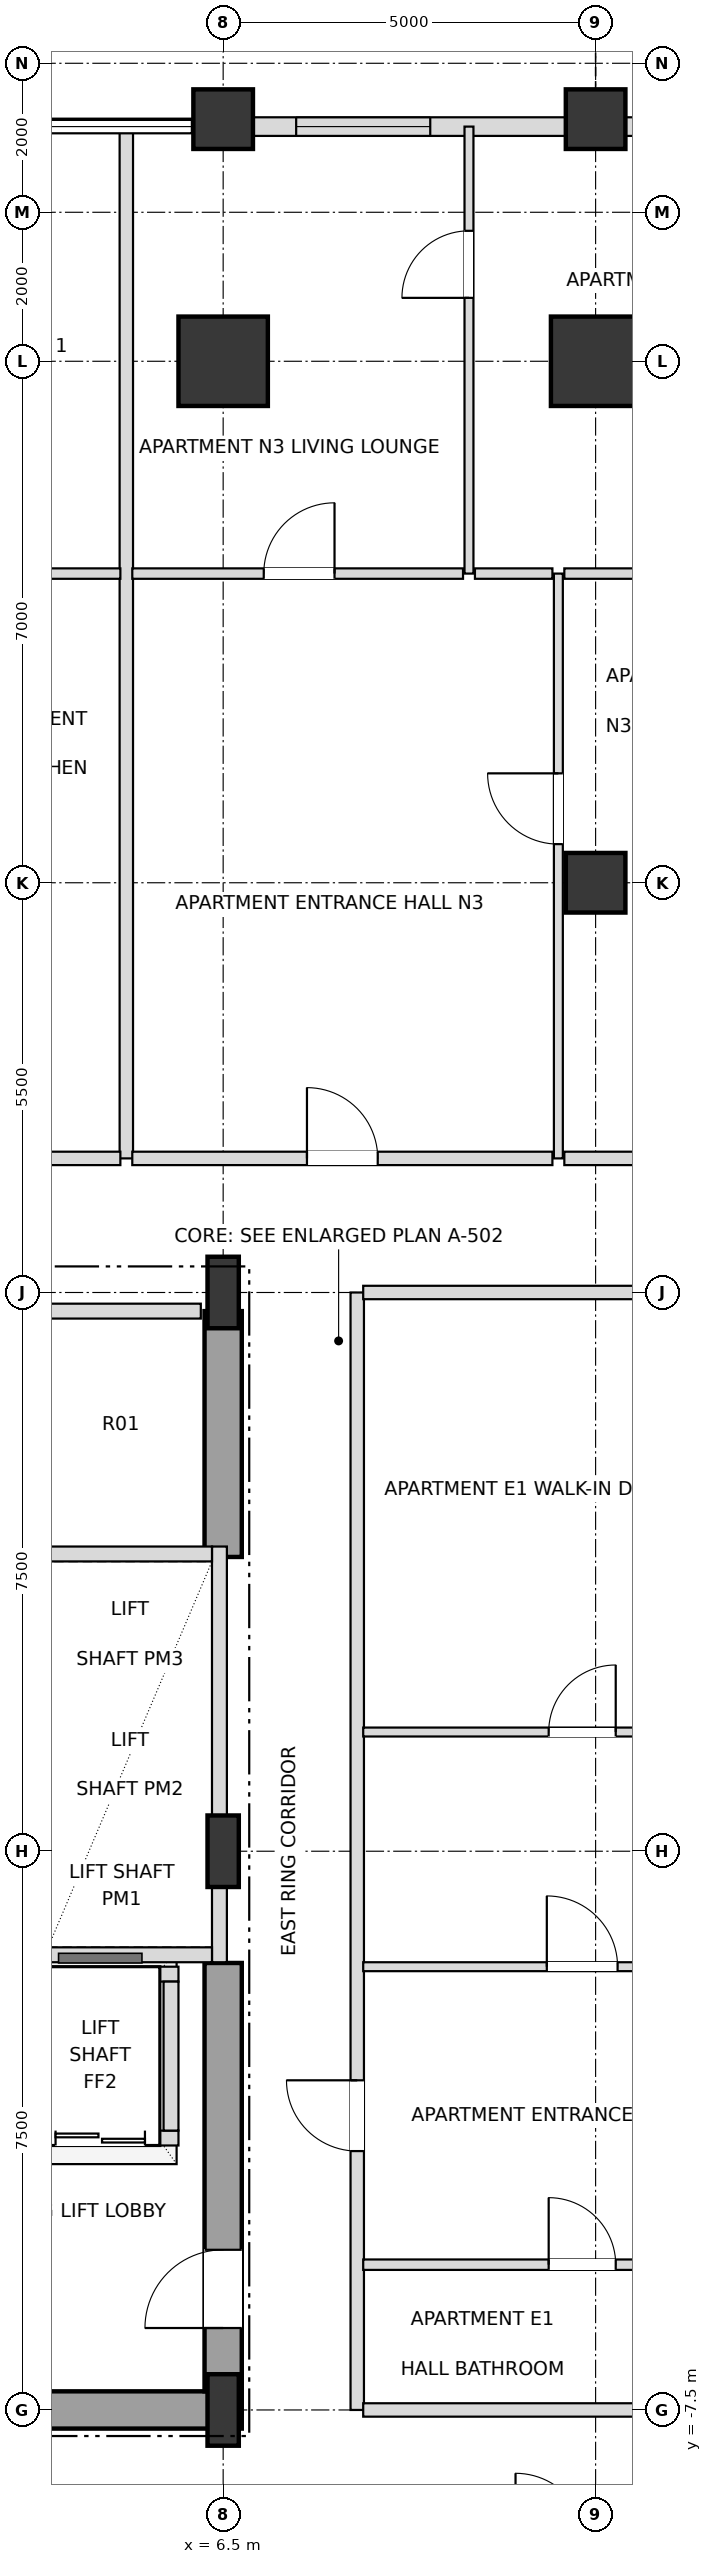
"""IFC4 building model, lengths in metres.
Left out: names, types, materials, properties, quantities, classifications, styles, units other than length and angle.
Written with IfcOpenShell. Run it as: python <this file> out.ifc"""

import sys

from ifc_helpers import new_model, si_unit, direction, frame, frame_2d, origin, origin_2d, place, context, subcontext, project, spatial, rectangle, i_section, extrude, element, fill, save


model = new_model("IFC4")
c1 = context("Model", 3, precision=1e-05, world=origin(), true_north=direction((0.0, 1.0)))
c2 = subcontext(c1, "Body", "Model", "MODEL_VIEW")
j1 = project(units=[si_unit("LENGTHUNIT", "METRE"), si_unit("PLANEANGLEUNIT", "RADIAN")], contexts=[c1])
p1 = place(None, origin())
s1 = spatial("IfcSite", under=j1, at=p1, CompositionType="ELEMENT")
p2 = place(p1, origin())
s2 = spatial("IfcBuilding", under=s1, at=p2, CompositionType="ELEMENT")
p3 = place(p2, frame((0.0, 0.0, 109.8)))
s3 = spatial("IfcBuildingStorey", under=s2, at=p3, CompositionType="ELEMENT", Elevation=109.8)
for number, where, z_axis, x_axis in (
    (1, (6.5, -7.5, 0.0), (0.0, 0.0, 1.0), (1.0, 0.0, 0.0)),
    (2, (6.5, 0.0, 0.0), (0.0, 0.0, 1.0), (1.0, 0.0, 0.0)),
    (3, (6.5, 7.5, 0.0), (0.0, 0.0, 1.0), (1.0, 0.0, 0.0)),
):
    element("IfcColumn", number, at=place(p3, frame(where, z_axis=z_axis, x_axis=x_axis)), inside=s3, PredefinedType="COLUMN", context=c2, shape_type="SweptSolid", body=[
        extrude(i_section(OverallWidth=0.42, OverallDepth=0.96, WebThickness=0.022, FlangeThickness=0.034, at=origin_2d()), origin(), (0.0, 0.0, 1.0), 3.6),
    ])
for number, where, z_axis, x_axis in (
    (4, (11.5, 20.0, 0.0), (0.0, 0.0, 1.0), (1.0, 0.0, 0.0)),
    (5, (6.5, 20.0, 0.0), (0.0, 0.0, 1.0), (1.0, 0.0, 0.0)),
):
    element("IfcColumn", number, at=place(p3, frame(where, z_axis=z_axis, x_axis=x_axis)), inside=s3, PredefinedType="USERDEFINED", context=c2, shape_type="SweptSolid", body=[
        extrude(rectangle(XDim=1.2, YDim=1.2, at=origin_2d()), origin(), (0.0, 0.0, 1.0), 3.6),
    ])
for number, where, z_axis, x_axis in (
    (6, (11.5, 13.0, 0.0), (0.0, 0.0, 1.0), (1.0, 0.0, 0.0)),
    (7, (6.5, 23.25, 0.0), (0.0, 0.0, 1.0), (1.0, 0.0, 0.0)),
    (8, (11.5, 23.25, 0.0), (0.0, 0.0, 1.0), (1.0, 0.0, 0.0)),
):
    element("IfcColumn", number, at=place(p3, frame(where, z_axis=z_axis, x_axis=x_axis)), inside=s3, PredefinedType="COLUMN", context=c2, shape_type="SweptSolid", body=[
        extrude(rectangle(XDim=0.8, YDim=0.8, at=origin_2d()), origin(), (0.0, 0.0, 1.0), 3.6),
    ])
p4 = place(p3, frame((15.675, 23.15, 0.0), z_axis=(0.0, 0.0, 1.0), x_axis=(-1.0, 0.0, 0.0)))
e9 = element("IfcWall", 9, at=p4, inside=s3, PredefinedType="SOLIDWALL", context=c2, shape_type="SweptSolid", body=[
    extrude(rectangle(XDim=3.78, YDim=0.25, at=frame_2d((1.89, 0.0))), origin(), (0.0, 0.0, 1.0), 2.736),
])
p5 = place(p4, frame((0.968, 0.0, 0.72)))
e10 = element("IfcOpeningElement", 10, at=p5, cuts=e9, PredefinedType="OPENING", context=c2, shape_type="SweptSolid", body=[
    extrude(rectangle(XDim=1.8, YDim=1.68, at=frame_2d((0.9, 0.84))), frame((0.0, 0.135, 0.0), z_axis=(0.0, -1.0, 0.0), x_axis=(1.0, 0.0, 0.0)), (0.0, 0.0, 1.0), 0.27),
])
p6 = place(p3, frame((11.105, 23.15, 0.0), z_axis=(0.0, 0.0, 1.0), x_axis=(-1.0, 0.0, 0.0)))
e11 = element("IfcWall", 11, at=p6, inside=s3, PredefinedType="SOLIDWALL", context=c2, shape_type="SweptSolid", body=[
    extrude(rectangle(XDim=4.21, YDim=0.25, at=frame_2d((2.105, 0.0))), origin(), (0.0, 0.0, 1.0), 2.736),
])
p7 = place(p6, frame((1.825, 0.0, 0.72)))
e12 = element("IfcOpeningElement", 12, at=p7, cuts=e11, PredefinedType="OPENING", context=c2, shape_type="SweptSolid", body=[
    extrude(rectangle(XDim=1.8, YDim=1.68, at=frame_2d((0.9, 0.84))), frame((0.0, 0.135, 0.0), z_axis=(0.0, -1.0, 0.0), x_axis=(1.0, 0.0, 0.0)), (0.0, 0.0, 1.0), 0.27),
])
p8 = place(p3, frame((0.0, -7.5, 0.0), z_axis=(0.0, 0.0, 1.0), x_axis=(1.0, 0.0, 0.0)))
e13 = element("IfcWall", 13, at=p8, inside=s3, PredefinedType="SHEAR", context=c2, shape_type="SweptSolid", body=[
    extrude(rectangle(XDim=6.75, YDim=0.5, at=frame_2d((3.375, 0.0))), origin(), (0.0, 0.0, 1.0), 3.38),
])
p9 = place(p3, frame((6.5, -7.25, 0.0), z_axis=(0.0, 0.0, 1.0), x_axis=(0.0, 1.0, 0.0)))
e14 = element("IfcWall", 14, at=p9, inside=s3, PredefinedType="SHEAR", context=c2, shape_type="SweptSolid", body=[
    extrude(rectangle(XDim=5.75, YDim=0.5, at=frame_2d((2.875, 0.0))), origin(), (0.0, 0.0, 1.0), 3.38),
])
p10 = place(p9, frame((0.85, 0.0, 0.0)))
e15 = element("IfcOpeningElement", 15, at=p10, cuts=e14, PredefinedType="OPENING", context=c2, shape_type="SweptSolid", body=[
    extrude(rectangle(XDim=1.05, YDim=2.15, at=frame_2d((0.525, 1.075))), frame((0.0, 0.26, 0.0), z_axis=(0.0, -1.0, 0.0), x_axis=(1.0, 0.0, 0.0)), (0.0, 0.0, 1.0), 0.52),
])
p11 = place(p3, frame((6.5, 3.95, 0.0), z_axis=(0.0, 0.0, 1.0), x_axis=(0.0, 1.0, 0.0)))
e16 = element("IfcWall", 16, at=p11, inside=s3, PredefinedType="SHEAR", context=c2, shape_type="SweptSolid", body=[
    extrude(rectangle(XDim=3.3, YDim=0.5, at=frame_2d((1.65, 0.0))), origin(), (0.0, 0.0, 1.0), 3.38),
])
p12 = place(p3, frame((6.45, -1.49, 0.0), z_axis=(0.0, 0.0, 1.0), x_axis=(0.0, 1.0, 0.0)))
e17 = element("IfcWall", 17, at=p12, inside=s3, PredefinedType="SOLIDWALL", context=c2, shape_type="SweptSolid", body=[
    extrude(rectangle(XDim=5.58, YDim=0.2, at=frame_2d((2.79, 0.0))), origin(), (0.0, 0.0, 1.0), 2.816),
])
for number, where, z_axis, x_axis in (
    (18, (4.15, -1.39, 0.0), (0.0, 0.0, 1.0), (1.0, 0.0, 0.0)),
    (19, (4.15, 3.99, 0.0), (0.0, 0.0, 1.0), (1.0, 0.0, 0.0)),
):
    element("IfcWall", number, at=place(p3, frame(where, z_axis=z_axis, x_axis=x_axis)), inside=s3, PredefinedType="SOLIDWALL", context=c2, shape_type="SweptSolid", body=[
        extrude(rectangle(XDim=2.2, YDim=0.2, at=frame_2d((1.1, 0.0))), origin(), (0.0, 0.0, 1.0), 3.38),
    ])
p13 = place(p3, frame((1.8, -3.85, 0.0), z_axis=(0.0, 0.0, 1.0), x_axis=(1.0, 0.0, 0.0)))
e20 = element("IfcWall", 20, at=p13, inside=s3, PredefinedType="SOLIDWALL", context=c2, shape_type="SweptSolid", body=[
    extrude(rectangle(XDim=4.1, YDim=0.2, at=frame_2d((2.05, 0.0))), origin(), (0.0, 0.0, 1.0), 3.38),
])
p14 = place(p13, frame((0.45, 0.0, 0.0)))
e21 = element("IfcOpeningElement", 21, at=p14, cuts=e20, PredefinedType="OPENING", context=c2, shape_type="SweptSolid", body=[
    extrude(rectangle(XDim=1.2, YDim=2.2, at=frame_2d((0.6, 1.1))), frame((0.0, 0.11, 0.0), z_axis=(0.0, -1.0, 0.0), x_axis=(1.0, 0.0, 0.0)), (0.0, 0.0, 1.0), 0.22),
])
p15 = place(p13, frame((2.45, 0.0, 0.0)))
e22 = element("IfcOpeningElement", 22, at=p15, cuts=e20, PredefinedType="OPENING", context=c2, shape_type="SweptSolid", body=[
    extrude(rectangle(XDim=1.2, YDim=2.2, at=frame_2d((0.6, 1.1))), frame((0.0, 0.11, 0.0), z_axis=(0.0, -1.0, 0.0), x_axis=(1.0, 0.0, 0.0)), (0.0, 0.0, 1.0), 0.22),
])
p16 = place(p3, frame((1.8, -1.65, 0.0), z_axis=(0.0, 0.0, 1.0), x_axis=(1.0, 0.0, 0.0)))
e23 = element("IfcWall", 23, at=p16, inside=s3, PredefinedType="SOLIDWALL", context=c2, shape_type="SweptSolid", body=[
    extrude(rectangle(XDim=4.1, YDim=0.2, at=frame_2d((2.05, 0.0))), origin(), (0.0, 0.0, 1.0), 3.38),
])
p17 = place(p3, frame((5.8, -3.75, 0.0), z_axis=(0.0, 0.0, 1.0), x_axis=(0.0, 1.0, 0.0)))
e24 = element("IfcWall", 24, at=p17, inside=s3, PredefinedType="SOLIDWALL", context=c2, shape_type="SweptSolid", body=[
    extrude(rectangle(XDim=2.0, YDim=0.2, at=frame_2d((1.0, 0.0))), origin(), (0.0, 0.0, 1.0), 3.38),
])
p18 = place(p3, frame((5.2, 9.3, 0.0), z_axis=(0.0, 0.0, 1.0), x_axis=(0.0, 1.0, 0.0)))
e25 = element("IfcWall", 25, at=p18, inside=s3, PredefinedType="PARTITIONING", context=c2, shape_type="SweptSolid", body=[
    extrude(rectangle(XDim=13.85, YDim=0.18, at=frame_2d((6.925, 0.0))), origin(), (0.0, 0.0, 1.0), 2.816),
])
p19 = place(p3, frame((8.3, -7.5, 0.0), z_axis=(0.0, 0.0, 1.0), x_axis=(0.0, 1.0, 0.0)))
e26 = element("IfcWall", 26, at=p19, inside=s3, PredefinedType="PARTITIONING", context=c2, shape_type="SweptSolid", body=[
    extrude(rectangle(XDim=15.0, YDim=0.18, at=frame_2d((7.5, 0.0))), origin(), (0.0, 0.0, 1.0), 3.38),
])
p20 = place(p19, frame((3.475, 0.0, 0.0)))
e27 = element("IfcOpeningElement", 27, at=p20, cuts=e26, PredefinedType="OPENING", context=c2, shape_type="SweptSolid", body=[
    extrude(rectangle(XDim=0.95, YDim=2.15, at=frame_2d((0.475, 1.075))), frame((0.0, 0.1, 0.0), z_axis=(0.0, -1.0, 0.0), x_axis=(1.0, 0.0, 0.0)), (0.0, 0.0, 1.0), 0.2),
])
p21 = place(p3, frame((9.8, 17.15, 0.0), z_axis=(0.0, 0.0, 1.0), x_axis=(0.0, 1.0, 0.0)))
e28 = element("IfcWall", 28, at=p21, inside=s3, PredefinedType="PARTITIONING", context=c2, shape_type="SweptSolid", body=[
    extrude(rectangle(XDim=6.0, YDim=0.12, at=frame_2d((3.0, 0.0))), origin(), (0.0, 0.0, 1.0), 2.816),
])
p22 = place(p21, frame((3.701, 0.0, 0.0)))
e29 = element("IfcOpeningElement", 29, at=p22, cuts=e28, PredefinedType="OPENING", context=c2, shape_type="SweptSolid", body=[
    extrude(rectangle(XDim=0.9, YDim=2.1, at=frame_2d((0.45, 1.05))), frame((0.0, 0.07, 0.0), z_axis=(0.0, -1.0, 0.0), x_axis=(1.0, 0.0, 0.0)), (0.0, 0.0, 1.0), 0.14),
])
p23 = place(p3, frame((11.0, 9.3, 0.0), z_axis=(0.0, 0.0, 1.0), x_axis=(0.0, 1.0, 0.0)))
e30 = element("IfcWall", 30, at=p23, inside=s3, PredefinedType="PARTITIONING", context=c2, shape_type="SweptSolid", body=[
    extrude(rectangle(XDim=7.85, YDim=0.12, at=frame_2d((3.925, 0.0))), origin(), (0.0, 0.0, 1.0), 2.816),
])
p24 = place(p23, frame((4.219, 0.0, 0.0)))
e31 = element("IfcOpeningElement", 31, at=p24, cuts=e30, PredefinedType="OPENING", context=c2, shape_type="SweptSolid", body=[
    extrude(rectangle(XDim=0.95, YDim=2.1, at=frame_2d((0.475, 1.05))), frame((0.0, 0.07, 0.0), z_axis=(0.0, -1.0, 0.0), x_axis=(1.0, 0.0, 0.0)), (0.0, 0.0, 1.0), 0.14),
])
p25 = place(p3, frame((8.38, -7.5, 0.0), z_axis=(0.0, 0.0, 1.0), x_axis=(1.0, 0.0, 0.0)))
e32 = element("IfcWall", 32, at=p25, inside=s3, PredefinedType="PARTITIONING", context=c2, shape_type="SweptSolid", body=[
    extrude(rectangle(XDim=5.89, YDim=0.18, at=frame_2d((2.945, 0.0))), origin(), (0.0, 0.0, 1.0), 2.816),
])
p26 = place(p3, frame((8.38, -5.55, 0.0), z_axis=(0.0, 0.0, 1.0), x_axis=(1.0, 0.0, 0.0)))
e33 = element("IfcWall", 33, at=p26, inside=s3, PredefinedType="PARTITIONING", context=c2, shape_type="SweptSolid", body=[
    extrude(rectangle(XDim=5.89, YDim=0.14, at=frame_2d((2.945, 0.0))), origin(), (0.0, 0.0, 1.0), 3.38),
])
p27 = place(p26, frame((2.49, 0.0, 0.0)))
e34 = element("IfcOpeningElement", 34, at=p27, cuts=e33, PredefinedType="OPENING", context=c2, shape_type="SweptSolid", body=[
    extrude(rectangle(XDim=0.9, YDim=2.1, at=frame_2d((0.45, 1.05))), frame((0.0, 0.08, 0.0), z_axis=(0.0, -1.0, 0.0), x_axis=(1.0, 0.0, 0.0)), (0.0, 0.0, 1.0), 0.16),
])
p28 = place(p3, frame((8.38, -1.55, 0.0), z_axis=(0.0, 0.0, 1.0), x_axis=(1.0, 0.0, 0.0)))
e35 = element("IfcWall", 35, at=p28, inside=s3, PredefinedType="PARTITIONING", context=c2, shape_type="SweptSolid", body=[
    extrude(rectangle(XDim=5.89, YDim=0.12, at=frame_2d((2.945, 0.0))), origin(), (0.0, 0.0, 1.0), 3.38),
])
p29 = place(p28, frame((2.465, 0.0, 0.0)))
e36 = element("IfcOpeningElement", 36, at=p29, cuts=e35, PredefinedType="OPENING", context=c2, shape_type="SweptSolid", body=[
    extrude(rectangle(XDim=0.95, YDim=2.1, at=frame_2d((0.475, 1.05))), frame((0.0, 0.07, 0.0), z_axis=(0.0, -1.0, 0.0), x_axis=(1.0, 0.0, 0.0)), (0.0, 0.0, 1.0), 0.14),
])
p30 = place(p3, frame((8.38, 1.6, 0.0), z_axis=(0.0, 0.0, 1.0), x_axis=(1.0, 0.0, 0.0)))
e37 = element("IfcWall", 37, at=p30, inside=s3, PredefinedType="PARTITIONING", context=c2, shape_type="SweptSolid", body=[
    extrude(rectangle(XDim=5.89, YDim=0.12, at=frame_2d((2.945, 0.0))), origin(), (0.0, 0.0, 1.0), 3.38),
])
p31 = place(p30, frame((2.49, 0.0, 0.0)))
e38 = element("IfcOpeningElement", 38, at=p31, cuts=e37, PredefinedType="OPENING", context=c2, shape_type="SweptSolid", body=[
    extrude(rectangle(XDim=0.9, YDim=2.1, at=frame_2d((0.45, 1.05))), frame((0.0, 0.07, 0.0), z_axis=(0.0, -1.0, 0.0), x_axis=(1.0, 0.0, 0.0)), (0.0, 0.0, 1.0), 0.14),
])
p32 = place(p3, frame((4.13, 7.25, 0.0), z_axis=(0.0, 0.0, 1.0), x_axis=(1.0, 0.0, 0.0)))
e39 = element("IfcWall", 39, at=p32, inside=s3, PredefinedType="SOLIDWALL", context=c2, shape_type="SweptSolid", body=[
    extrude(rectangle(XDim=2.07, YDim=0.2, at=frame_2d((1.035, 0.0))), origin(), (0.0, 0.0, 1.0), 3.38),
])
p33 = place(p3, frame((8.38, 7.5, 0.0), z_axis=(0.0, 0.0, 1.0), x_axis=(1.0, 0.0, 0.0)))
e40 = element("IfcWall", 40, at=p33, inside=s3, PredefinedType="PARTITIONING", context=c2, shape_type="SweptSolid", body=[
    extrude(rectangle(XDim=5.89, YDim=0.18, at=frame_2d((2.945, 0.0))), origin(), (0.0, 0.0, 1.0), 2.816),
])
p34 = place(p3, frame((2.58, 9.3, 0.0), z_axis=(0.0, 0.0, 1.0), x_axis=(1.0, 0.0, 0.0)))
e41 = element("IfcWall", 41, at=p34, inside=s3, PredefinedType="PARTITIONING", context=c2, shape_type="SweptSolid", body=[
    extrude(rectangle(XDim=2.54, YDim=0.18, at=frame_2d((1.27, 0.0))), origin(), (0.0, 0.0, 1.0), 3.38),
])
p35 = place(p3, frame((5.28, 9.3, 0.0), z_axis=(0.0, 0.0, 1.0), x_axis=(1.0, 0.0, 0.0)))
e42 = element("IfcWall", 42, at=p35, inside=s3, PredefinedType="PARTITIONING", context=c2, shape_type="SweptSolid", body=[
    extrude(rectangle(XDim=5.64, YDim=0.18, at=frame_2d((2.82, 0.0))), origin(), (0.0, 0.0, 1.0), 2.816),
])
p36 = place(p35, frame((2.345, 0.0, 0.0)))
e43 = element("IfcOpeningElement", 43, at=p36, cuts=e42, PredefinedType="OPENING", context=c2, shape_type="SweptSolid", body=[
    extrude(rectangle(XDim=0.95, YDim=2.15, at=frame_2d((0.475, 1.075))), frame((0.0, 0.1, 0.0), z_axis=(0.0, -1.0, 0.0), x_axis=(1.0, 0.0, 0.0)), (0.0, 0.0, 1.0), 0.2),
])
p37 = place(p3, frame((11.08, 9.3, 0.0), z_axis=(0.0, 0.0, 1.0), x_axis=(1.0, 0.0, 0.0)))
e44 = element("IfcWall", 44, at=p37, inside=s3, PredefinedType="PARTITIONING", context=c2, shape_type="SweptSolid", body=[
    extrude(rectangle(XDim=2.54, YDim=0.18, at=frame_2d((1.27, 0.0))), origin(), (0.0, 0.0, 1.0), 3.38),
])
p38 = place(p3, frame((2.58, 17.15, 0.0), z_axis=(0.0, 0.0, 1.0), x_axis=(1.0, 0.0, 0.0)))
e45 = element("IfcWall", 45, at=p38, inside=s3, PredefinedType="PARTITIONING", context=c2, shape_type="SweptSolid", body=[
    extrude(rectangle(XDim=2.54, YDim=0.14, at=frame_2d((1.27, 0.0))), origin(), (0.0, 0.0, 1.0), 3.38),
])
p39 = place(p3, frame((5.28, 17.15, 0.0), z_axis=(0.0, 0.0, 1.0), x_axis=(1.0, 0.0, 0.0)))
e46 = element("IfcWall", 46, at=p39, inside=s3, PredefinedType="PARTITIONING", context=c2, shape_type="SweptSolid", body=[
    extrude(rectangle(XDim=4.44, YDim=0.14, at=frame_2d((2.22, 0.0))), origin(), (0.0, 0.0, 1.0), 2.816),
])
p40 = place(p39, frame((1.765, 0.0, 0.0)))
e47 = element("IfcOpeningElement", 47, at=p40, cuts=e46, PredefinedType="OPENING", context=c2, shape_type="SweptSolid", body=[
    extrude(rectangle(XDim=0.95, YDim=2.1, at=frame_2d((0.475, 1.05))), frame((0.0, 0.08, 0.0), z_axis=(0.0, -1.0, 0.0), x_axis=(1.0, 0.0, 0.0)), (0.0, 0.0, 1.0), 0.16),
])
p41 = place(p3, frame((9.88, 17.15, 0.0), z_axis=(0.0, 0.0, 1.0), x_axis=(1.0, 0.0, 0.0)))
e48 = element("IfcWall", 48, at=p41, inside=s3, PredefinedType="PARTITIONING", context=c2, shape_type="SweptSolid", body=[
    extrude(rectangle(XDim=1.04, YDim=0.14, at=frame_2d((0.52, 0.0))), origin(), (0.0, 0.0, 1.0), 3.38),
])
p42 = place(p3, frame((11.08, 17.15, 0.0), z_axis=(0.0, 0.0, 1.0), x_axis=(1.0, 0.0, 0.0)))
e49 = element("IfcWall", 49, at=p42, inside=s3, PredefinedType="PARTITIONING", context=c2, shape_type="SweptSolid", body=[
    extrude(rectangle(XDim=2.54, YDim=0.14, at=frame_2d((1.27, 0.0))), origin(), (0.0, 0.0, 1.0), 2.736),
])
p43 = place(p7, origin())
e50 = element("IfcWindow", 50, at=p43, inside=s3, PartitioningType="SINGLE_PANEL", PredefinedType="WINDOW", context=c2, shape_type="SweptSolid", body=[
    extrude(rectangle(XDim=1.8, YDim=1.68, at=frame_2d((0.9, 0.84))), frame((0.0, 0.03, 0.0), z_axis=(0.0, -1.0, 0.0), x_axis=(1.0, 0.0, 0.0)), (0.0, 0.0, 1.0), 0.06),
])
fill(e12, e50)
p44 = place(p10, origin())
e51 = element("IfcDoor", 51, at=p44, inside=s3, OperationType="SINGLE_SWING_LEFT", PredefinedType="DOOR", context=c2, shape_type="SweptSolid", body=[
    extrude(rectangle(XDim=1.05, YDim=2.15, at=frame_2d((0.525, 1.075))), frame((0.0, 0.025, 0.0), z_axis=(0.0, -1.0, 0.0), x_axis=(1.0, 0.0, 0.0)), (0.0, 0.0, 1.0), 0.05),
])
fill(e15, e51)
p45 = place(p15, origin())
e52 = element("IfcDoor", 52, at=p45, inside=s3, OperationType="DOUBLE_DOOR_SLIDING", PredefinedType="DOOR", context=c2, shape_type="SweptSolid", body=[
    extrude(rectangle(XDim=1.2, YDim=2.2, at=frame_2d((0.6, 1.1))), frame((0.0, 0.025, 0.0), z_axis=(0.0, -1.0, 0.0), x_axis=(1.0, 0.0, 0.0)), (0.0, 0.0, 1.0), 0.05),
])
fill(e22, e52)
p46 = place(p36, origin())
e53 = element("IfcDoor", 53, at=p46, inside=s3, OperationType="SINGLE_SWING_LEFT", PredefinedType="DOOR", context=c2, shape_type="SweptSolid", body=[
    extrude(rectangle(XDim=0.95, YDim=2.15, at=frame_2d((0.475, 1.075))), frame((0.0, 0.025, 0.0), z_axis=(0.0, -1.0, 0.0), x_axis=(1.0, 0.0, 0.0)), (0.0, 0.0, 1.0), 0.05),
])
fill(e43, e53)
p47 = place(p24, origin())
e54 = element("IfcDoor", 54, at=p47, inside=s3, OperationType="SINGLE_SWING_RIGHT", PredefinedType="DOOR", context=c2, shape_type="SweptSolid", body=[
    extrude(rectangle(XDim=0.95, YDim=2.1, at=frame_2d((0.475, 1.05))), frame((0.0, 0.025, 0.0), z_axis=(0.0, -1.0, 0.0), x_axis=(1.0, 0.0, 0.0)), (0.0, 0.0, 1.0), 0.05),
])
fill(e31, e54)
p48 = place(p40, origin())
e55 = element("IfcDoor", 55, at=p48, inside=s3, OperationType="SINGLE_SWING_RIGHT", PredefinedType="DOOR", context=c2, shape_type="SweptSolid", body=[
    extrude(rectangle(XDim=0.95, YDim=2.1, at=frame_2d((0.475, 1.05))), frame((0.0, 0.025, 0.0), z_axis=(0.0, -1.0, 0.0), x_axis=(1.0, 0.0, 0.0)), (0.0, 0.0, 1.0), 0.05),
])
fill(e47, e55)
p49 = place(p22, origin())
e56 = element("IfcDoor", 56, at=p49, inside=s3, OperationType="SINGLE_SWING_LEFT", PredefinedType="DOOR", context=c2, shape_type="SweptSolid", body=[
    extrude(rectangle(XDim=0.9, YDim=2.1, at=frame_2d((0.45, 1.05))), frame((0.0, 0.025, 0.0), z_axis=(0.0, -1.0, 0.0), x_axis=(1.0, 0.0, 0.0)), (0.0, 0.0, 1.0), 0.05),
])
fill(e29, e56)
p50 = place(p27, origin())
e57 = element("IfcDoor", 57, at=p50, inside=s3, OperationType="SINGLE_SWING_LEFT", PredefinedType="DOOR", context=c2, shape_type="SweptSolid", body=[
    extrude(rectangle(XDim=0.9, YDim=2.1, at=frame_2d((0.45, 1.05))), frame((0.0, 0.025, 0.0), z_axis=(0.0, -1.0, 0.0), x_axis=(1.0, 0.0, 0.0)), (0.0, 0.0, 1.0), 0.05),
])
fill(e34, e57)
p51 = place(p20, origin())
e58 = element("IfcDoor", 58, at=p51, inside=s3, OperationType="SINGLE_SWING_RIGHT", PredefinedType="DOOR", context=c2, shape_type="SweptSolid", body=[
    extrude(rectangle(XDim=0.95, YDim=2.15, at=frame_2d((0.475, 1.075))), frame((0.0, 0.025, 0.0), z_axis=(0.0, -1.0, 0.0), x_axis=(1.0, 0.0, 0.0)), (0.0, 0.0, 1.0), 0.05),
])
fill(e27, e58)
p52 = place(p29, origin())
e59 = element("IfcDoor", 59, at=p52, inside=s3, OperationType="SINGLE_SWING_LEFT", PredefinedType="DOOR", context=c2, shape_type="SweptSolid", body=[
    extrude(rectangle(XDim=0.95, YDim=2.1, at=frame_2d((0.475, 1.05))), frame((0.0, 0.025, 0.0), z_axis=(0.0, -1.0, 0.0), x_axis=(1.0, 0.0, 0.0)), (0.0, 0.0, 1.0), 0.05),
])
fill(e36, e59)
p53 = place(p31, origin())
e60 = element("IfcDoor", 60, at=p53, inside=s3, OperationType="SINGLE_SWING_RIGHT", PredefinedType="DOOR", context=c2, shape_type="SweptSolid", body=[
    extrude(rectangle(XDim=0.9, YDim=2.1, at=frame_2d((0.45, 1.05))), frame((0.0, 0.025, 0.0), z_axis=(0.0, -1.0, 0.0), x_axis=(1.0, 0.0, 0.0)), (0.0, 0.0, 1.0), 0.05),
])
fill(e38, e60)
save(model, sys.argv[1])
